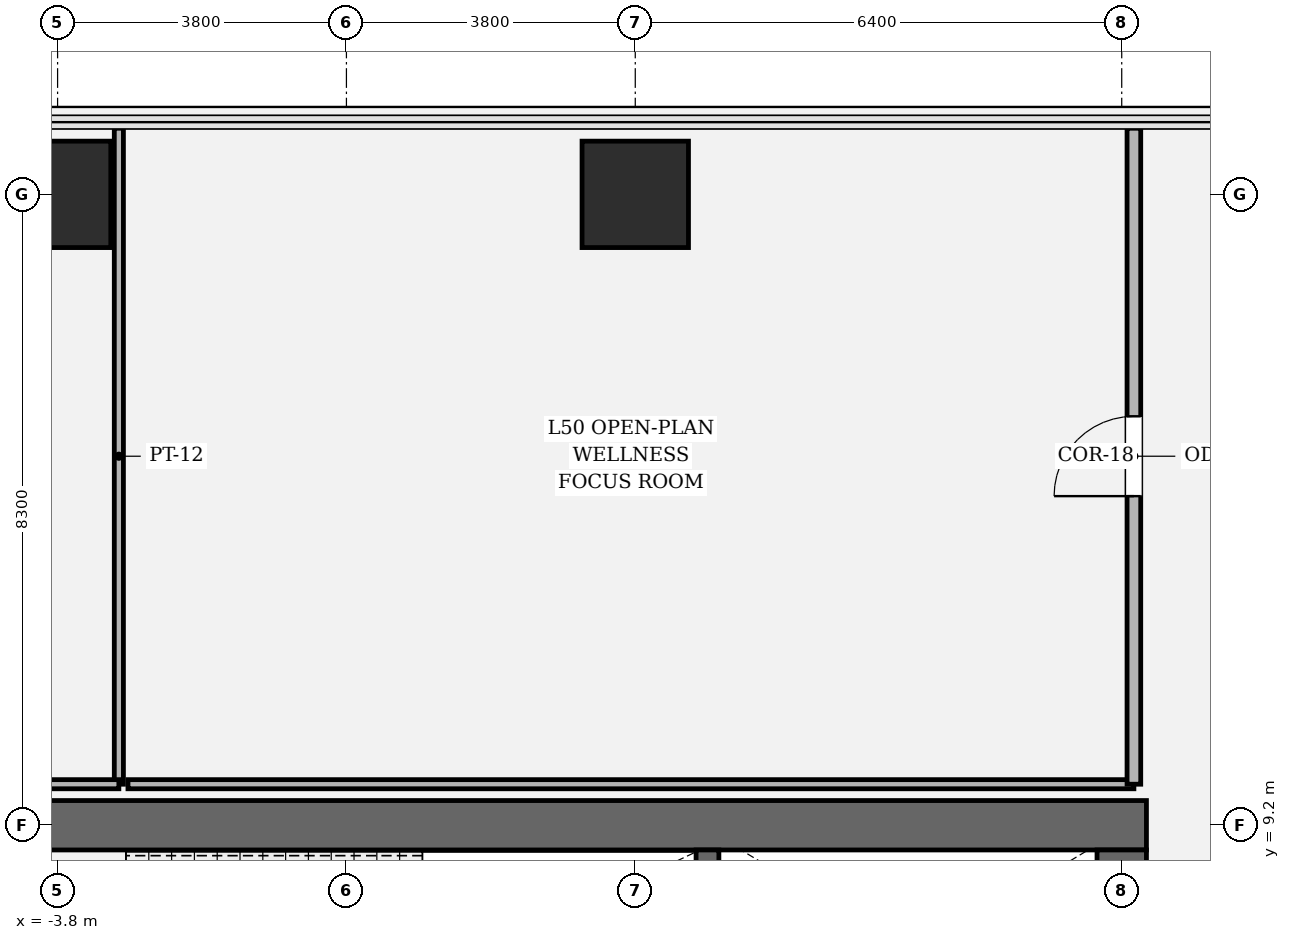
"""IFC4 building model, lengths in metres.
Left out: names, types, materials, properties, quantities, classifications, styles, units other than length and angle.
Written with IfcOpenShell. Run it as: python <this file> out.ifc"""

import sys

from ifc_helpers import new_model, si_unit, direction, frame, frame_2d, origin, origin_2d, place, context, subcontext, project, spatial, rectangle, hollow_rectangle, extrude, element, fill, save


model = new_model("IFC4")
c1 = context("Model", 3, precision=1e-05, world=origin(), true_north=direction((0.0, 1.0)))
c2 = subcontext(c1, "Body", "Model", "MODEL_VIEW")
j1 = project(units=[si_unit("LENGTHUNIT", "METRE"), si_unit("PLANEANGLEUNIT", "RADIAN")], contexts=[c1])
p1 = place(None, origin())
s1 = spatial("IfcSite", under=j1, at=p1, CompositionType="ELEMENT")
p2 = place(p1, origin())
s2 = spatial("IfcBuilding", under=s1, at=p2, CompositionType="ELEMENT")
p3 = place(p2, frame((0.0, 0.0, 212.7)))
s3 = spatial("IfcBuildingStorey", under=s2, at=p3, CompositionType="ELEMENT", Elevation=212.7)
p4 = place(p3, frame((-10.525, 9.2, 0.0), z_axis=(0.0, 0.0, 1.0), x_axis=(1.0, 0.0, 0.0)))
e1 = element("IfcWall", 1, at=p4, inside=s3, PredefinedType="SHEAR", context=c2, shape_type="SweptSolid", body=[
    extrude(rectangle(XDim=21.05, YDim=0.65, at=frame_2d((10.525, 0.0))), origin(), (0.0, 0.0, 1.0), 4.05),
])
p5 = place(p3, frame((10.2, 8.875, 0.0), z_axis=(0.0, 0.0, 1.0), x_axis=(0.0, -1.0, 0.0)))
e2 = element("IfcWall", 2, at=p5, inside=s3, PredefinedType="SHEAR", context=c2, shape_type="SweptSolid", body=[
    extrude(rectangle(XDim=17.75, YDim=0.65, at=frame_2d((8.875, 0.0))), origin(), (0.0, 0.0, 1.0), 4.05),
])
p6 = place(p5, frame((3.905, 0.0, 0.0)))
e3 = element("IfcOpeningElement", 3, at=p6, cuts=e2, PredefinedType="OPENING", context=c2, shape_type="SweptSolid", body=[
    extrude(rectangle(XDim=1.18, YDim=2.2, at=frame_2d((0.59, 1.1))), frame((0.0, 0.335, 0.0), z_axis=(0.0, -1.0, 0.0), x_axis=(1.0, 0.0, 0.0)), (0.0, 0.0, 1.0), 0.67),
])
p7 = place(p3, frame((4.75, 8.875, 0.0), z_axis=(0.0, 0.0, 1.0), x_axis=(0.0, -1.0, 0.0)))
e4 = element("IfcWall", 4, at=p7, inside=s3, PredefinedType="SOLIDWALL", context=c2, shape_type="SweptSolid", body=[
    extrude(rectangle(XDim=3.575, YDim=0.3, at=frame_2d((1.788, 0.0))), origin(), (0.0, 0.0, 1.0), 4.05),
])
for number, where, z_axis, x_axis in (
    (5, (3.8, 17.5, 0.0), (0.0, 0.0, 1.0), (1.0, 0.0, 0.0)),
    (6, (-3.8, 17.5, 0.0), (0.0, 0.0, 1.0), (1.0, 0.0, 0.0)),
):
    element("IfcColumn", number, at=place(p3, frame(where, z_axis=z_axis, x_axis=x_axis)), inside=s3, PredefinedType="COLUMN", context=c2, shape_type="SweptSolid", body=[
        extrude(hollow_rectangle(XDim=1.4, YDim=1.4, WallThickness=0.042, at=origin_2d()), origin(), (0.0, 0.0, 1.0), 4.05),
    ])
p8 = place(p3, frame((-2.994, 18.37, 0.0), z_axis=(0.0, 0.0, 1.0), x_axis=(0.0, -1.0, 0.0)))
e7 = element("IfcWall", 7, at=p8, inside=s3, PredefinedType="PARTITIONING", context=c2, shape_type="SweptSolid", body=[
    extrude(rectangle(XDim=8.63, YDim=0.12, at=frame_2d((4.315, 0.0))), origin(), (0.0, 0.0, 1.0), 3.174),
])
p9 = place(p3, frame((-2.994, 9.74, 0.0), z_axis=(0.0, 0.0, 1.0), x_axis=(-1.0, 0.0, 0.0)))
e8 = element("IfcWall", 8, at=p9, inside=s3, PredefinedType="PARTITIONING", context=c2, shape_type="SweptSolid", body=[
    extrude(rectangle(XDim=7.366, YDim=0.12, at=frame_2d((3.683, 0.0))), origin(), (0.0, 0.0, 1.0), 3.174),
])
p10 = place(p3, frame((10.36, 9.74, 0.0), z_axis=(0.0, 0.0, 1.0), x_axis=(-1.0, 0.0, 0.0)))
e9 = element("IfcWall", 9, at=p10, inside=s3, PredefinedType="PARTITIONING", context=c2, shape_type="SweptSolid", body=[
    extrude(rectangle(XDim=13.234, YDim=0.12, at=frame_2d((6.617, 0.0))), origin(), (0.0, 0.0, 1.0), 3.174),
])
p11 = place(p3, frame((10.36, 18.37, 0.0), z_axis=(0.0, 0.0, 1.0), x_axis=(0.0, -1.0, 0.0)))
e10 = element("IfcWall", 10, at=p11, inside=s3, PredefinedType="PARTITIONING", context=c2, shape_type="SweptSolid", body=[
    extrude(rectangle(XDim=8.63, YDim=0.18, at=frame_2d((4.315, 0.0))), origin(), (0.0, 0.0, 1.0), 3.174),
])
p12 = place(p11, frame((3.79, 0.0, 0.0)))
e11 = element("IfcOpeningElement", 11, at=p12, cuts=e10, PredefinedType="OPENING", context=c2, shape_type="SweptSolid", body=[
    extrude(rectangle(XDim=1.05, YDim=2.2, at=frame_2d((0.525, 1.1))), frame((0.0, 0.1, 0.0), z_axis=(0.0, -1.0, 0.0), x_axis=(1.0, 0.0, 0.0)), (0.0, 0.0, 1.0), 0.2),
])
p13 = place(p12, origin())
e12 = element("IfcDoor", 12, at=p13, inside=s3, OperationType="SINGLE_SWING_RIGHT", PredefinedType="DOOR", context=c2, shape_type="SweptSolid", body=[
    extrude(rectangle(XDim=1.05, YDim=2.2, at=frame_2d((0.525, 1.1))), frame((0.0, 0.025, 0.0), z_axis=(0.0, -1.0, 0.0), x_axis=(1.0, 0.0, 0.0)), (0.0, 0.0, 1.0), 0.05),
])
fill(e11, e12)
save(model, sys.argv[1])
